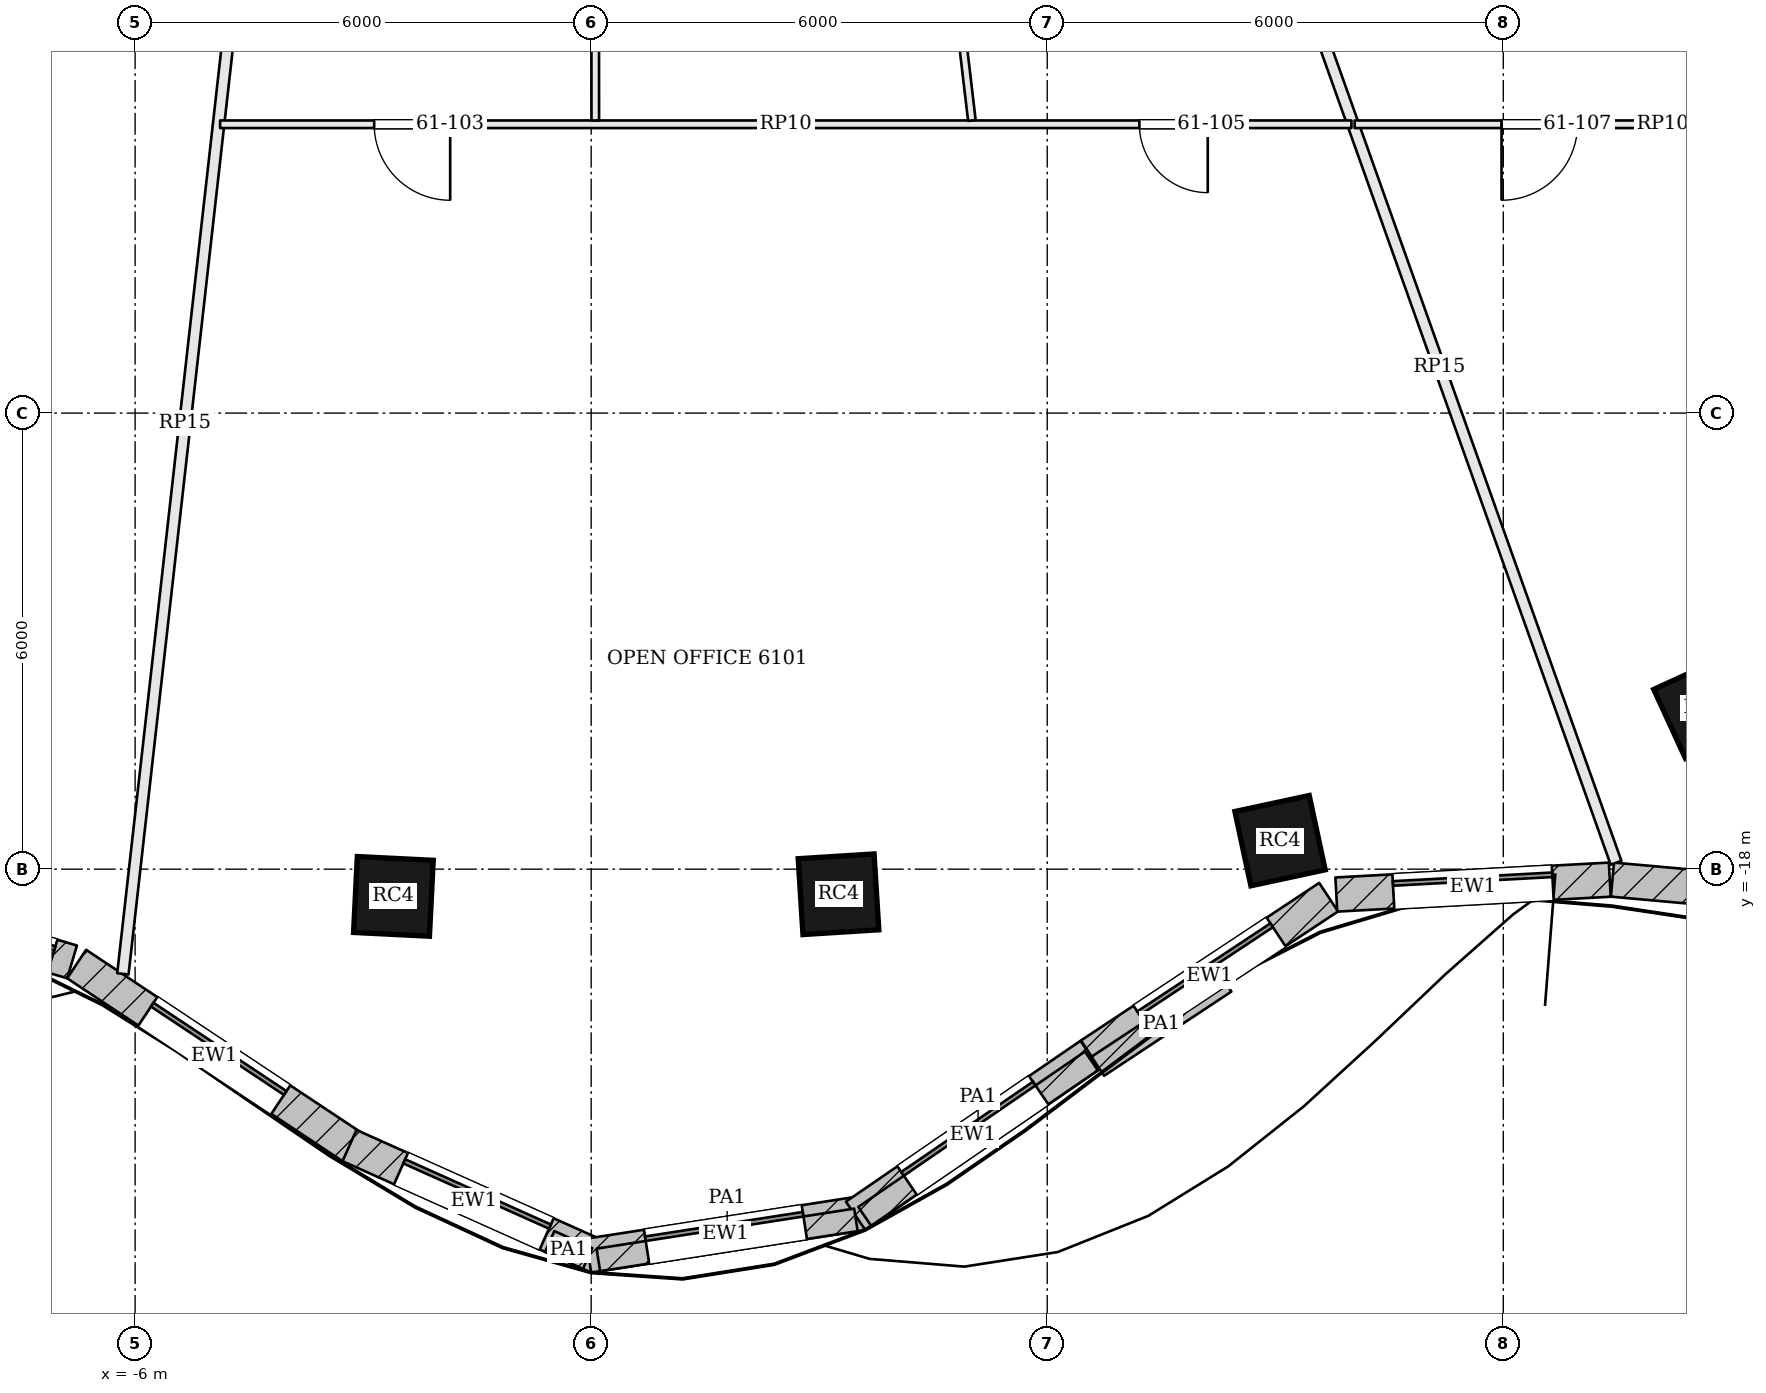
"""IFC4 building model, lengths in metres.
Left out: names, types, materials, properties, quantities, classifications, styles, units other than length and angle.
Written with IfcOpenShell. Run it as: python <this file> out.ifc"""

import sys

from ifc_helpers import new_model, si_unit, direction, frame, frame_2d, origin, origin_2d, place, context, subcontext, project, spatial, rectangle, extrude, element, fill, save


model = new_model("IFC4")
c1 = context("Model", 3, precision=1e-05, world=origin(), true_north=direction((0.0, 1.0)))
c2 = subcontext(c1, "Body", "Model", "MODEL_VIEW")
j1 = project(units=[si_unit("LENGTHUNIT", "METRE"), si_unit("PLANEANGLEUNIT", "RADIAN")], contexts=[c1])
p1 = place(None, origin())
s1 = spatial("IfcSite", under=j1, at=p1, CompositionType="ELEMENT")
p2 = place(p1, origin())
s2 = spatial("IfcBuilding", under=s1, at=p2, CompositionType="ELEMENT")
p3 = place(p2, frame((0.0, 0.0, 248.7)))
s3 = spatial("IfcBuildingStorey", under=s2, at=p3, CompositionType="ELEMENT", Elevation=248.7)
for number, where, z_axis, x_axis in (
    (1, (-2.602, -18.358, 0.0), (0.0, 0.0, 1.0), (0.999, -0.05, 0.0)),
    (2, (3.254, -18.33, 0.0), (0.0, 0.0, 1.0), (0.998, 0.063, 0.0)),
    (3, (9.063, -17.625, 0.0), (0.0, 0.0, 1.0), (0.978, 0.21, 0.0)),
    (4, (14.643, -15.881, 0.0), (0.0, 0.0, 1.0), (0.909, 0.417, 0.0)),
):
    element("IfcColumn", number, at=place(p3, frame(where, z_axis=z_axis, x_axis=x_axis)), inside=s3, PredefinedType="COLUMN", context=c2, shape_type="SweptSolid", body=[
        extrude(rectangle(XDim=1.0, YDim=1.0, at=origin_2d()), origin(), (0.0, 0.0, 1.0), 3.9),
    ])
p4 = place(p3, frame((-9.357, -18.469, 0.0), z_axis=(0.0, 0.0, 1.0), x_axis=(0.958524054629, -0.285011643091, 0.0)))
e5 = element("IfcWall", 5, at=p4, inside=s3, PredefinedType="SOLIDWALL", context=c2, shape_type="SweptSolid", body=[
    extrude(rectangle(XDim=2.637, YDim=0.45, at=frame_2d((1.319, 0.0))), origin(), (0.0, 0.0, 1.0), 3.7),
])
p5 = place(p4, frame((0.269, 0.0, 0.9)))
e6 = element("IfcOpeningElement", 6, at=p5, cuts=e5, PredefinedType="OPENING", context=c2, shape_type="SweptSolid", body=[
    extrude(rectangle(XDim=2.1, YDim=2.3, at=frame_2d((1.05, 1.15))), frame((0.0, 0.235, 0.0), z_axis=(0.0, -1.0, 0.0), x_axis=(1.0, 0.0, 0.0)), (0.0, 0.0, 1.0), 0.47),
])
p6 = place(p3, frame((-6.769, -19.248, 0.0), z_axis=(0.0, 0.0, 1.0), x_axis=(0.832973379274, -0.553313066375, 0.0)))
e7 = element("IfcWall", 7, at=p6, inside=s3, PredefinedType="SOLIDWALL", context=c2, shape_type="SweptSolid", body=[
    extrude(rectangle(XDim=4.348, YDim=0.45, at=frame_2d((2.174, 0.0))), origin(), (0.0, 0.0, 1.0), 3.7),
])
p7 = place(p6, frame((1.124, 0.0, 0.9)))
e8 = element("IfcOpeningElement", 8, at=p7, cuts=e7, PredefinedType="OPENING", context=c2, shape_type="SweptSolid", body=[
    extrude(rectangle(XDim=2.1, YDim=2.3, at=frame_2d((1.05, 1.15))), frame((0.0, 0.235, 0.0), z_axis=(0.0, -1.0, 0.0), x_axis=(1.0, 0.0, 0.0)), (0.0, 0.0, 1.0), 0.47),
])
p8 = place(p3, frame((-3.179, -21.636, 0.0), z_axis=(0.0, 0.0, 1.0), x_axis=(0.912608353595, -0.40883492139, 0.0)))
e9 = element("IfcWall", 9, at=p8, inside=s3, PredefinedType="SOLIDWALL", context=c2, shape_type="SweptSolid", body=[
    extrude(rectangle(XDim=3.585, YDim=0.45, at=frame_2d((1.792, 0.0))), origin(), (0.0, 0.0, 1.0), 3.7),
])
p9 = place(p8, frame((0.742, 0.0, 0.9)))
e10 = element("IfcOpeningElement", 10, at=p9, cuts=e9, PredefinedType="OPENING", context=c2, shape_type="SweptSolid", body=[
    extrude(rectangle(XDim=2.1, YDim=2.3, at=frame_2d((1.05, 1.15))), frame((0.0, 0.235, 0.0), z_axis=(0.0, -1.0, 0.0), x_axis=(1.0, 0.0, 0.0)), (0.0, 0.0, 1.0), 0.47),
])
p10 = place(p3, frame((-0.035, -23.085, 0.0), z_axis=(0.0, 0.0, 1.0), x_axis=(0.988133637562, 0.153596596054, 0.0)))
e11 = element("IfcWall", 11, at=p10, inside=s3, PredefinedType="SOLIDWALL", context=c2, shape_type="SweptSolid", body=[
    extrude(rectangle(XDim=3.646, YDim=0.45, at=frame_2d((1.823, 0.0))), origin(), (0.0, 0.0, 1.0), 3.7),
])
p11 = place(p10, frame((0.773, 0.0, 0.9)))
e12 = element("IfcOpeningElement", 12, at=p11, cuts=e11, PredefinedType="OPENING", context=c2, shape_type="SweptSolid", body=[
    extrude(rectangle(XDim=2.1, YDim=2.3, at=frame_2d((1.05, 1.15))), frame((0.0, 0.235, 0.0), z_axis=(0.0, -1.0, 0.0), x_axis=(1.0, 0.0, 0.0)), (0.0, 0.0, 1.0), 0.47),
])
p12 = place(p3, frame((3.479, -22.56, 0.0), z_axis=(0.0, 0.0, 1.0), x_axis=(0.824722766417, 0.565537230033, 0.0)))
e13 = element("IfcWall", 13, at=p12, inside=s3, PredefinedType="SOLIDWALL", context=c2, shape_type="SweptSolid", body=[
    extrude(rectangle(XDim=3.742, YDim=0.45, at=frame_2d((1.871, 0.0))), origin(), (0.0, 0.0, 1.0), 3.7),
])
p13 = place(p12, frame((0.821, 0.0, 0.9)))
e14 = element("IfcOpeningElement", 14, at=p13, cuts=e13, PredefinedType="OPENING", context=c2, shape_type="SweptSolid", body=[
    extrude(rectangle(XDim=2.1, YDim=2.3, at=frame_2d((1.05, 1.15))), frame((0.0, 0.235, 0.0), z_axis=(0.0, -1.0, 0.0), x_axis=(1.0, 0.0, 0.0)), (0.0, 0.0, 1.0), 0.47),
])
p14 = place(p3, frame((6.568, -20.441, 0.0), z_axis=(0.0, 0.0, 1.0), x_axis=(0.834034214531, 0.551712723246, 0.0)))
e15 = element("IfcWall", 15, at=p14, inside=s3, PredefinedType="SOLIDWALL", context=c2, shape_type="SweptSolid", body=[
    extrude(rectangle(XDim=3.757, YDim=0.45, at=frame_2d((1.879, 0.0))), origin(), (0.0, 0.0, 1.0), 3.7),
])
p15 = place(p14, frame((0.829, 0.0, 0.9)))
e16 = element("IfcOpeningElement", 16, at=p15, cuts=e15, PredefinedType="OPENING", context=c2, shape_type="SweptSolid", body=[
    extrude(rectangle(XDim=2.1, YDim=2.3, at=frame_2d((1.05, 1.15))), frame((0.0, 0.235, 0.0), z_axis=(0.0, -1.0, 0.0), x_axis=(1.0, 0.0, 0.0)), (0.0, 0.0, 1.0), 0.47),
])
p16 = place(p3, frame((9.803, -18.334, 0.0), z_axis=(0.0, 0.0, 1.0), x_axis=(0.998525941495, 0.054276552602, 0.0)))
e17 = element("IfcWall", 17, at=p16, inside=s3, PredefinedType="SOLIDWALL", context=c2, shape_type="SweptSolid", body=[
    extrude(rectangle(XDim=3.603, YDim=0.45, at=frame_2d((1.802, 0.0))), origin(), (0.0, 0.0, 1.0), 3.7),
])
p17 = place(p16, frame((0.751, 0.0, 0.9)))
e18 = element("IfcOpeningElement", 18, at=p17, cuts=e17, PredefinedType="OPENING", context=c2, shape_type="SweptSolid", body=[
    extrude(rectangle(XDim=2.1, YDim=2.3, at=frame_2d((1.05, 1.15))), frame((0.0, 0.235, 0.0), z_axis=(0.0, -1.0, 0.0), x_axis=(1.0, 0.0, 0.0)), (0.0, 0.0, 1.0), 0.47),
])
p18 = place(p3, frame((13.436, -18.138, 0.0), z_axis=(0.0, 0.0, 1.0), x_axis=(0.99598810213, -0.089485755376, 0.0)))
e19 = element("IfcWall", 19, at=p18, inside=s3, PredefinedType="SOLIDWALL", context=c2, shape_type="SweptSolid", body=[
    extrude(rectangle(XDim=5.451, YDim=0.45, at=frame_2d((2.726, 0.0))), origin(), (0.0, 0.0, 1.0), 3.7),
])
p19 = place(p18, frame((1.676, 0.0, 0.9)))
e20 = element("IfcOpeningElement", 20, at=p19, cuts=e19, PredefinedType="OPENING", context=c2, shape_type="SweptSolid", body=[
    extrude(rectangle(XDim=2.1, YDim=2.3, at=frame_2d((1.05, 1.15))), frame((0.0, 0.235, 0.0), z_axis=(0.0, -1.0, 0.0), x_axis=(1.0, 0.0, 0.0)), (0.0, 0.0, 1.0), 0.47),
])
p20 = place(p3, frame((-0.545, -22.898, 3.9), z_axis=(0.0, 0.0, 1.0), x_axis=(0.912497815069, -0.409081578044, 0.0)))
e21 = element("IfcWall", 21, at=p20, inside=s3, PredefinedType="PARAPET", context=c2, shape_type="SweptSolid", body=[
    extrude(rectangle(XDim=0.546, YDim=0.3, at=frame_2d((0.273, 0.0))), origin(), (0.0, 0.0, 1.0), 1.1),
])
p21 = place(p3, frame((0.094, -23.14, 3.9), z_axis=(0.0, 0.0, 1.0), x_axis=(0.988150084887, 0.153490748056, 0.0)))
e22 = element("IfcWall", 22, at=p21, inside=s3, PredefinedType="PARAPET", context=c2, shape_type="SweptSolid", body=[
    extrude(rectangle(XDim=3.429, YDim=0.3, at=frame_2d((1.715, 0.0))), origin(), (0.0, 0.0, 1.0), 1.1),
])
p22 = place(p3, frame((3.599, -22.568, 3.9), z_axis=(0.0, 0.0, 1.0), x_axis=(0.82476034254, 0.565482428881, 0.0)))
e23 = element("IfcWall", 23, at=p22, inside=s3, PredefinedType="PARAPET", context=c2, shape_type="SweptSolid", body=[
    extrude(rectangle(XDim=3.616, YDim=0.3, at=frame_2d((1.808, 0.0))), origin(), (0.0, 0.0, 1.0), 1.1),
])
p23 = place(p3, frame((6.665, -20.593, 3.9), z_axis=(0.0, 0.0, 1.0), x_axis=(0.834027642059, 0.551722658843, 0.0)))
e24 = element("IfcWall", 24, at=p23, inside=s3, PredefinedType="PARAPET", context=c2, shape_type="SweptSolid", body=[
    extrude(rectangle(XDim=2.008, YDim=0.3, at=frame_2d((1.004, 0.0))), origin(), (0.0, 0.0, 1.0), 1.1),
])
p24 = place(p3, frame((-6.161, -19.377, 0.0), z_axis=(0.0, 0.0, 1.0), x_axis=(0.111927750306, 0.99371634721, 0.0)))
e25 = element("IfcWall", 25, at=p24, inside=s3, PredefinedType="PARTITIONING", context=c2, shape_type="SweptSolid", body=[
    extrude(rectangle(XDim=14.595, YDim=0.15, at=frame_2d((7.297, 0.0))), origin(), (0.0, 0.0, 1.0), 3.084),
])
p25 = place(p3, frame((13.483, -17.916, 0.0), z_axis=(0.0, 0.0, 1.0), x_axis=(-0.335482994468, 0.942046262358, 0.0)))
e26 = element("IfcWall", 26, at=p25, inside=s3, PredefinedType="PARTITIONING", context=c2, shape_type="SweptSolid", body=[
    extrude(rectangle(XDim=13.848, YDim=0.15, at=frame_2d((6.924, 0.0))), origin(), (0.0, 0.0, 1.0), 3.084),
])
p26 = place(p3, frame((10.002, -8.2, 0.0), z_axis=(0.0, 0.0, 1.0), x_axis=(-1.0, 0.0, 0.0)))
e27 = element("IfcWall", 27, at=p26, inside=s3, PredefinedType="PARTITIONING", context=c2, shape_type="SweptSolid", body=[
    extrude(rectangle(XDim=14.884, YDim=0.1, at=frame_2d((7.442, 0.0))), origin(), (0.0, 0.0, 1.0), 3.084),
])
p27 = place(p26, frame((11.857, 0.0, 0.0)))
e28 = element("IfcOpeningElement", 28, at=p27, cuts=e27, PredefinedType="OPENING", context=c2, shape_type="SweptSolid", body=[
    extrude(rectangle(XDim=1.0, YDim=2.1, at=frame_2d((0.5, 1.05))), frame((0.0, 0.06, 0.0), z_axis=(0.0, -1.0, 0.0), x_axis=(1.0, 0.0, 0.0)), (0.0, 0.0, 1.0), 0.12),
])
p28 = place(p26, frame((1.89, 0.0, 0.0)))
e29 = element("IfcOpeningElement", 29, at=p28, cuts=e27, PredefinedType="OPENING", context=c2, shape_type="SweptSolid", body=[
    extrude(rectangle(XDim=0.9, YDim=2.1, at=frame_2d((0.45, 1.05))), frame((0.0, 0.06, 0.0), z_axis=(0.0, -1.0, 0.0), x_axis=(1.0, 0.0, 0.0)), (0.0, 0.0, 1.0), 0.12),
])
p29 = place(p3, frame((0.052, -4.875, 0.0), z_axis=(0.0, 0.0, 1.0), x_axis=(0.000596391723, -0.999999822158, 0.0)))
e30 = element("IfcWall", 30, at=p29, inside=s3, PredefinedType="PARTITIONING", context=c2, shape_type="SweptSolid", body=[
    extrude(rectangle(XDim=3.275, YDim=0.1, at=frame_2d((1.637, 0.0))), origin(), (0.0, 0.0, 1.0), 3.084),
])
p30 = place(p3, frame((4.623, -4.875, 0.0), z_axis=(0.0, 0.0, 1.0), x_axis=(0.116871308631, -0.993147067266, 0.0)))
e31 = element("IfcWall", 31, at=p30, inside=s3, PredefinedType="PARTITIONING", context=c2, shape_type="SweptSolid", body=[
    extrude(rectangle(XDim=3.299, YDim=0.1, at=frame_2d((1.649, 0.0))), origin(), (0.0, 0.0, 1.0), 3.084),
])
p31 = place(p3, frame((18.15, -8.2, 0.0), z_axis=(0.0, 0.0, 1.0), x_axis=(-1.0, 0.0, 0.0)))
e32 = element("IfcWall", 32, at=p31, inside=s3, PredefinedType="PARTITIONING", context=c2, shape_type="SweptSolid", body=[
    extrude(rectangle(XDim=8.105, YDim=0.1, at=frame_2d((4.053, 0.0))), origin(), (0.0, 0.0, 1.0), 3.084),
])
p32 = place(p31, frame((5.173, 0.0, 0.0)))
e33 = element("IfcOpeningElement", 33, at=p32, cuts=e32, PredefinedType="OPENING", context=c2, shape_type="SweptSolid", body=[
    extrude(rectangle(XDim=1.0, YDim=2.1, at=frame_2d((0.5, 1.05))), frame((0.0, 0.06, 0.0), z_axis=(0.0, -1.0, 0.0), x_axis=(1.0, 0.0, 0.0)), (0.0, 0.0, 1.0), 0.12),
])
p33 = place(p3, frame((12.506, -4.857, 0.0), z_axis=(0.0, 0.0, 1.0), x_axis=(0.651598528349, -0.758564010387, 0.0)))
e34 = element("IfcWall", 34, at=p33, inside=s3, PredefinedType="PARTITIONING", context=c2, shape_type="SweptSolid", body=[
    extrude(rectangle(XDim=4.357, YDim=0.1, at=frame_2d((2.179, 0.0))), origin(), (0.0, 0.0, 1.0), 3.084),
])
p34 = place(p5, origin())
e35 = element("IfcWindow", 35, at=p34, inside=s3, PartitioningType="SINGLE_PANEL", PredefinedType="WINDOW", context=c2, shape_type="SweptSolid", body=[
    extrude(rectangle(XDim=2.1, YDim=2.3, at=frame_2d((1.05, 1.15))), frame((0.0, 0.135, 0.0), z_axis=(0.0, -1.0, 0.0), x_axis=(1.0, 0.0, 0.0)), (0.0, 0.0, 1.0), 0.06),
])
fill(e6, e35)
p35 = place(p7, origin())
e36 = element("IfcWindow", 36, at=p35, inside=s3, PartitioningType="SINGLE_PANEL", PredefinedType="WINDOW", context=c2, shape_type="SweptSolid", body=[
    extrude(rectangle(XDim=2.1, YDim=2.3, at=frame_2d((1.05, 1.15))), frame((0.0, 0.135, 0.0), z_axis=(0.0, -1.0, 0.0), x_axis=(1.0, 0.0, 0.0)), (0.0, 0.0, 1.0), 0.06),
])
fill(e8, e36)
p36 = place(p9, origin())
e37 = element("IfcWindow", 37, at=p36, inside=s3, PartitioningType="SINGLE_PANEL", PredefinedType="WINDOW", context=c2, shape_type="SweptSolid", body=[
    extrude(rectangle(XDim=2.1, YDim=2.3, at=frame_2d((1.05, 1.15))), frame((0.0, 0.135, 0.0), z_axis=(0.0, -1.0, 0.0), x_axis=(1.0, 0.0, 0.0)), (0.0, 0.0, 1.0), 0.06),
])
fill(e10, e37)
p37 = place(p11, origin())
e38 = element("IfcWindow", 38, at=p37, inside=s3, PartitioningType="SINGLE_PANEL", PredefinedType="WINDOW", context=c2, shape_type="SweptSolid", body=[
    extrude(rectangle(XDim=2.1, YDim=2.3, at=frame_2d((1.05, 1.15))), frame((0.0, 0.135, 0.0), z_axis=(0.0, -1.0, 0.0), x_axis=(1.0, 0.0, 0.0)), (0.0, 0.0, 1.0), 0.06),
])
fill(e12, e38)
p38 = place(p13, origin())
e39 = element("IfcWindow", 39, at=p38, inside=s3, PartitioningType="SINGLE_PANEL", PredefinedType="WINDOW", context=c2, shape_type="SweptSolid", body=[
    extrude(rectangle(XDim=2.1, YDim=2.3, at=frame_2d((1.05, 1.15))), frame((0.0, 0.135, 0.0), z_axis=(0.0, -1.0, 0.0), x_axis=(1.0, 0.0, 0.0)), (0.0, 0.0, 1.0), 0.06),
])
fill(e14, e39)
p39 = place(p15, origin())
e40 = element("IfcWindow", 40, at=p39, inside=s3, PartitioningType="SINGLE_PANEL", PredefinedType="WINDOW", context=c2, shape_type="SweptSolid", body=[
    extrude(rectangle(XDim=2.1, YDim=2.3, at=frame_2d((1.05, 1.15))), frame((0.0, 0.135, 0.0), z_axis=(0.0, -1.0, 0.0), x_axis=(1.0, 0.0, 0.0)), (0.0, 0.0, 1.0), 0.06),
])
fill(e16, e40)
p40 = place(p17, origin())
e41 = element("IfcWindow", 41, at=p40, inside=s3, PartitioningType="SINGLE_PANEL", PredefinedType="WINDOW", context=c2, shape_type="SweptSolid", body=[
    extrude(rectangle(XDim=2.1, YDim=2.3, at=frame_2d((1.05, 1.15))), frame((0.0, 0.135, 0.0), z_axis=(0.0, -1.0, 0.0), x_axis=(1.0, 0.0, 0.0)), (0.0, 0.0, 1.0), 0.06),
])
fill(e18, e41)
p41 = place(p27, origin())
e42 = element("IfcDoor", 42, at=p41, inside=s3, OperationType="SINGLE_SWING_LEFT", PredefinedType="DOOR", context=c2, shape_type="SweptSolid", body=[
    extrude(rectangle(XDim=1.0, YDim=2.1, at=frame_2d((0.5, 1.05))), frame((0.0, 0.025, 0.0), z_axis=(0.0, -1.0, 0.0), x_axis=(1.0, 0.0, 0.0)), (0.0, 0.0, 1.0), 0.05),
])
fill(e28, e42)
p42 = place(p28, origin())
e43 = element("IfcDoor", 43, at=p42, inside=s3, OperationType="SINGLE_SWING_LEFT", PredefinedType="DOOR", context=c2, shape_type="SweptSolid", body=[
    extrude(rectangle(XDim=0.9, YDim=2.1, at=frame_2d((0.45, 1.05))), frame((0.0, 0.025, 0.0), z_axis=(0.0, -1.0, 0.0), x_axis=(1.0, 0.0, 0.0)), (0.0, 0.0, 1.0), 0.05),
])
fill(e29, e43)
p43 = place(p32, origin())
e44 = element("IfcDoor", 44, at=p43, inside=s3, OperationType="SINGLE_SWING_RIGHT", PredefinedType="DOOR", context=c2, shape_type="SweptSolid", body=[
    extrude(rectangle(XDim=1.0, YDim=2.1, at=frame_2d((0.5, 1.05))), frame((0.0, 0.025, 0.0), z_axis=(0.0, -1.0, 0.0), x_axis=(1.0, 0.0, 0.0)), (0.0, 0.0, 1.0), 0.05),
])
fill(e33, e44)
save(model, sys.argv[1])
